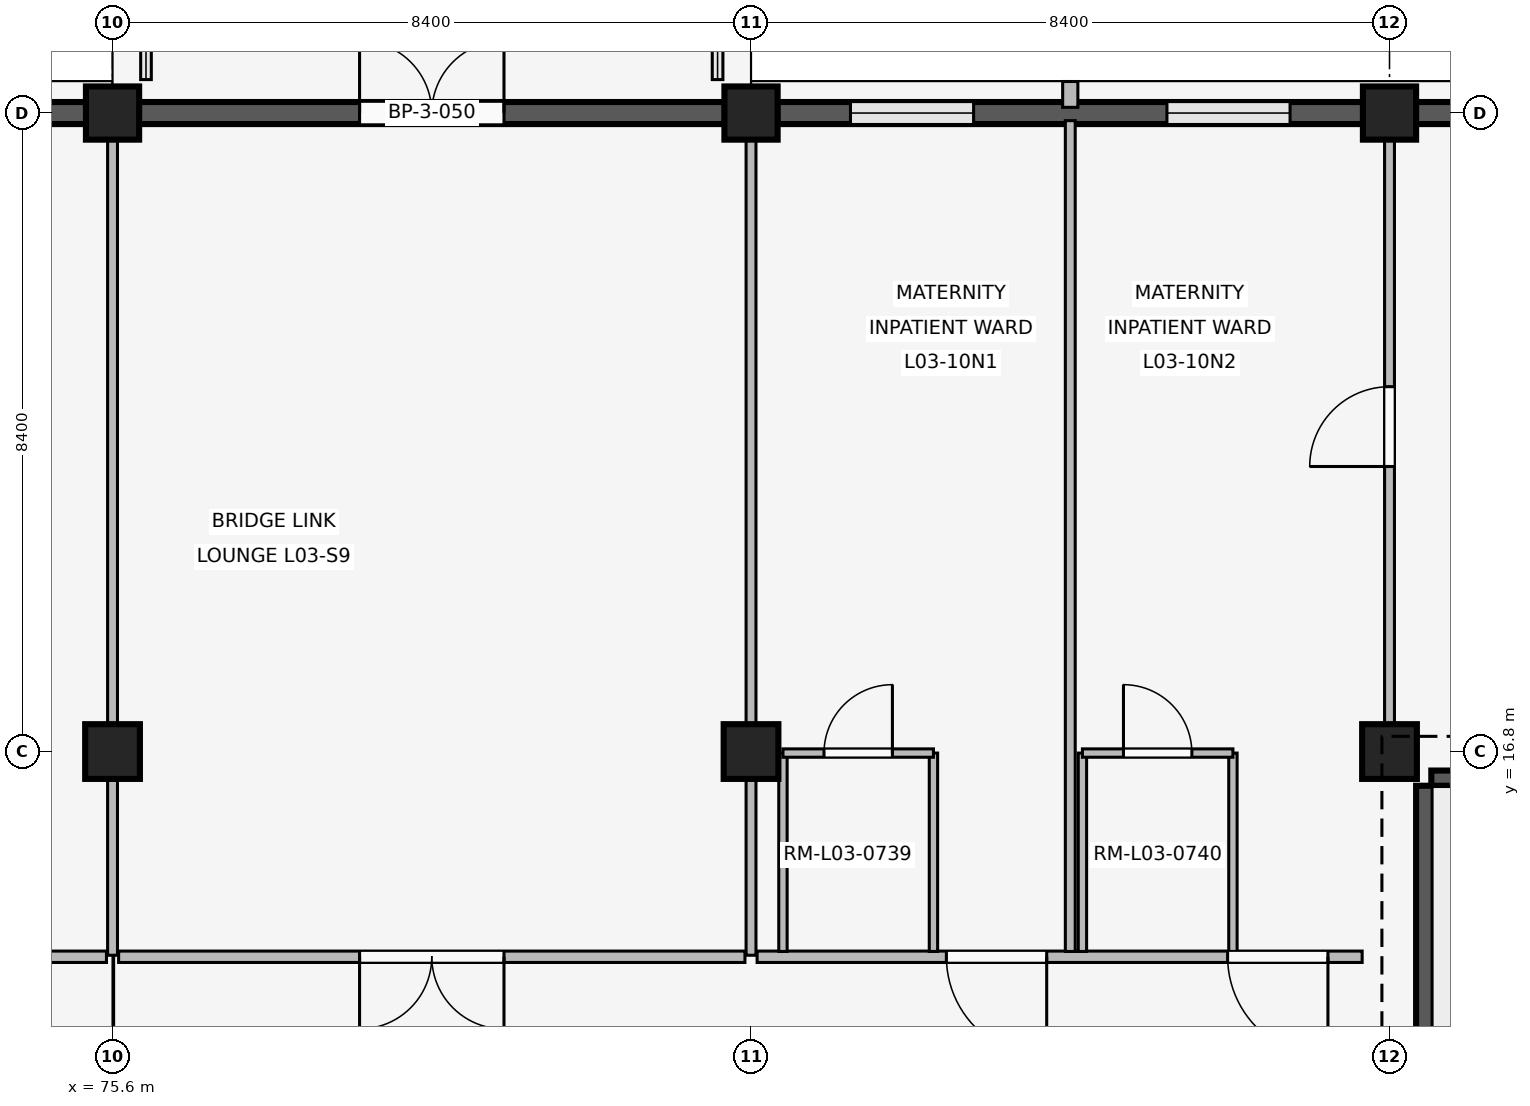
"""IFC4 building model, lengths in metres.
Left out: names, types, materials, properties, quantities, classifications, styles, units other than length and angle.
Written with IfcOpenShell. Run it as: python <this file> out.ifc"""

import sys

from ifc_helpers import new_model, si_unit, direction, frame, frame_2d, origin, origin_2d, place, context, subcontext, project, spatial, rectangle, extrude, element, fill, save


model = new_model("IFC4")
c1 = context("Model", 3, precision=1e-05, world=origin(), true_north=direction((0.0, 1.0)))
c2 = subcontext(c1, "Body", "Model", "MODEL_VIEW")
j1 = project(units=[si_unit("LENGTHUNIT", "METRE"), si_unit("PLANEANGLEUNIT", "RADIAN")], contexts=[c1])
p1 = place(None, origin())
s1 = spatial("IfcSite", under=j1, at=p1, CompositionType="ELEMENT")
p2 = place(p1, origin())
s2 = spatial("IfcBuilding", under=s1, at=p2, CompositionType="ELEMENT")
p3 = place(p2, frame((0.0, 0.0, 12.9)))
s3 = spatial("IfcBuildingStorey", under=s2, at=p3, CompositionType="ELEMENT", Elevation=12.9)
p4 = place(p3, frame((75.6, 16.8, 0.0), z_axis=(0.0, 0.0, 1.0), x_axis=(1.0, 0.0, 0.0)))
e1 = element("IfcColumn", 1, at=p4, inside=s3, PredefinedType="COLUMN", context=c2, shape_type="SweptSolid", body=[
    extrude(rectangle(XDim=0.72, YDim=0.72, at=origin_2d()), origin(), (0.0, 0.0, 1.0), 3.3),
])
p5 = place(p3, frame((75.6, 25.2, 0.0), z_axis=(0.0, 0.0, 1.0), x_axis=(1.0, 0.0, 0.0)))
e2 = element("IfcColumn", 2, at=p5, inside=s3, PredefinedType="COLUMN", context=c2, shape_type="SweptSolid", body=[
    extrude(rectangle(XDim=0.7, YDim=0.7, at=origin_2d()), origin(), (0.0, 0.0, 1.0), 3.3),
])
p6 = place(p3, frame((84.0, 16.8, 0.0), z_axis=(0.0, 0.0, 1.0), x_axis=(1.0, 0.0, 0.0)))
e3 = element("IfcColumn", 3, at=p6, inside=s3, PredefinedType="COLUMN", context=c2, shape_type="SweptSolid", body=[
    extrude(rectangle(XDim=0.72, YDim=0.72, at=origin_2d()), origin(), (0.0, 0.0, 1.0), 3.3),
])
p7 = place(p3, frame((84.0, 25.2, 0.0), z_axis=(0.0, 0.0, 1.0), x_axis=(1.0, 0.0, 0.0)))
e4 = element("IfcColumn", 4, at=p7, inside=s3, PredefinedType="COLUMN", context=c2, shape_type="SweptSolid", body=[
    extrude(rectangle(XDim=0.7, YDim=0.7, at=origin_2d()), origin(), (0.0, 0.0, 1.0), 3.3),
])
p8 = place(p3, frame((92.4, 16.8, 0.0), z_axis=(0.0, 0.0, 1.0), x_axis=(1.0, 0.0, 0.0)))
e5 = element("IfcColumn", 5, at=p8, inside=s3, PredefinedType="COLUMN", context=c2, shape_type="SweptSolid", body=[
    extrude(rectangle(XDim=0.72, YDim=0.72, at=origin_2d()), origin(), (0.0, 0.0, 1.0), 3.3),
])
p9 = place(p3, frame((92.4, 25.2, 0.0), z_axis=(0.0, 0.0, 1.0), x_axis=(1.0, 0.0, 0.0)))
e6 = element("IfcColumn", 6, at=p9, inside=s3, PredefinedType="COLUMN", context=c2, shape_type="SweptSolid", body=[
    extrude(rectangle(XDim=0.7, YDim=0.7, at=origin_2d()), origin(), (0.0, 0.0, 1.0), 3.3),
])
p10 = place(p3, frame((67.545, 25.2, 0.0), z_axis=(0.0, 0.0, 1.0), x_axis=(1.0, 0.0, 0.0)))
e7 = element("IfcWall", 7, at=p10, inside=s3, PredefinedType="SOLIDWALL", context=c2, shape_type="SweptSolid", body=[
    extrude(rectangle(XDim=7.71, YDim=0.29, at=frame_2d((3.855, 0.0))), origin(), (0.0, 0.0, 1.0), 2.44),
])
p11 = place(p10, frame((0.963, 0.0, 0.85)))
e8 = element("IfcOpeningElement", 8, at=p11, cuts=e7, PredefinedType="OPENING", context=c2, shape_type="SweptSolid", body=[
    extrude(rectangle(XDim=1.62, YDim=0.95, at=frame_2d((0.81, 0.475))), frame((0.0, 0.155, 0.0), z_axis=(0.0, -1.0, 0.0), x_axis=(1.0, 0.0, 0.0)), (0.0, 0.0, 1.0), 0.31),
])
p12 = place(p10, frame((5.127, 0.0, 0.85)))
e9 = element("IfcOpeningElement", 9, at=p12, cuts=e7, PredefinedType="OPENING", context=c2, shape_type="SweptSolid", body=[
    extrude(rectangle(XDim=1.62, YDim=0.95, at=frame_2d((0.81, 0.475))), frame((0.0, 0.155, 0.0), z_axis=(0.0, -1.0, 0.0), x_axis=(1.0, 0.0, 0.0)), (0.0, 0.0, 1.0), 0.31),
])
p13 = place(p3, frame((75.945, 25.2, 0.0), z_axis=(0.0, 0.0, 1.0), x_axis=(1.0, 0.0, 0.0)))
e10 = element("IfcWall", 10, at=p13, inside=s3, PredefinedType="SOLIDWALL", context=c2, shape_type="SweptSolid", body=[
    extrude(rectangle(XDim=7.71, YDim=0.29, at=frame_2d((3.855, 0.0))), origin(), (0.0, 0.0, 1.0), 2.44),
])
p14 = place(p13, frame((2.905, 0.0, 0.0)))
e11 = element("IfcOpeningElement", 11, at=p14, cuts=e10, PredefinedType="OPENING", context=c2, shape_type="SweptSolid", body=[
    extrude(rectangle(XDim=1.9, YDim=2.32, at=frame_2d((0.95, 1.16))), frame((0.0, 0.155, 0.0), z_axis=(0.0, -1.0, 0.0), x_axis=(1.0, 0.0, 0.0)), (0.0, 0.0, 1.0), 0.31),
])
p15 = place(p3, frame((84.345, 25.2, 0.0), z_axis=(0.0, 0.0, 1.0), x_axis=(1.0, 0.0, 0.0)))
e12 = element("IfcWall", 12, at=p15, inside=s3, PredefinedType="SOLIDWALL", context=c2, shape_type="SweptSolid", body=[
    extrude(rectangle(XDim=7.71, YDim=0.29, at=frame_2d((3.855, 0.0))), origin(), (0.0, 0.0, 1.0), 2.44),
])
p16 = place(p15, frame((0.963, 0.0, 0.85)))
e13 = element("IfcOpeningElement", 13, at=p16, cuts=e12, PredefinedType="OPENING", context=c2, shape_type="SweptSolid", body=[
    extrude(rectangle(XDim=1.62, YDim=0.95, at=frame_2d((0.81, 0.475))), frame((0.0, 0.155, 0.0), z_axis=(0.0, -1.0, 0.0), x_axis=(1.0, 0.0, 0.0)), (0.0, 0.0, 1.0), 0.31),
])
p17 = place(p15, frame((5.127, 0.0, 0.85)))
e14 = element("IfcOpeningElement", 14, at=p17, cuts=e12, PredefinedType="OPENING", context=c2, shape_type="SweptSolid", body=[
    extrude(rectangle(XDim=1.62, YDim=0.95, at=frame_2d((0.81, 0.475))), frame((0.0, 0.155, 0.0), z_axis=(0.0, -1.0, 0.0), x_axis=(1.0, 0.0, 0.0)), (0.0, 0.0, 1.0), 0.31),
])
p18 = place(p3, frame((88.2, 25.275, 0.0), z_axis=(0.0, 0.0, 1.0), x_axis=(0.0, 1.0, 0.0)))
e15 = element("IfcWall", 15, at=p18, inside=s3, PredefinedType="ELEMENTEDWALL", context=c2, shape_type="SweptSolid", body=[
    extrude(rectangle(XDim=0.34, YDim=0.2, at=frame_2d((0.17, 0.0))), origin(), (0.0, 0.0, 1.0), 2.42),
])
p19 = place(p3, frame((92.745, 25.2, 0.0), z_axis=(0.0, 0.0, 1.0), x_axis=(1.0, 0.0, 0.0)))
e16 = element("IfcWall", 16, at=p19, inside=s3, PredefinedType="SOLIDWALL", context=c2, shape_type="SweptSolid", body=[
    extrude(rectangle(XDim=7.71, YDim=0.29, at=frame_2d((3.855, 0.0))), origin(), (0.0, 0.0, 1.0), 2.44),
])
p20 = place(p19, frame((1.043, 0.0, 0.85)))
e17 = element("IfcOpeningElement", 17, at=p20, cuts=e16, PredefinedType="OPENING", context=c2, shape_type="SweptSolid", body=[
    extrude(rectangle(XDim=1.46, YDim=0.85, at=frame_2d((0.73, 0.425))), frame((0.0, 0.155, 0.0), z_axis=(0.0, -1.0, 0.0), x_axis=(1.0, 0.0, 0.0)), (0.0, 0.0, 1.0), 0.31),
])
p21 = place(p19, frame((5.207, 0.0, 0.85)))
e18 = element("IfcOpeningElement", 18, at=p21, cuts=e16, PredefinedType="OPENING", context=c2, shape_type="SweptSolid", body=[
    extrude(rectangle(XDim=1.46, YDim=0.85, at=frame_2d((0.73, 0.425))), frame((0.0, 0.155, 0.0), z_axis=(0.0, -1.0, 0.0), x_axis=(1.0, 0.0, 0.0)), (0.0, 0.0, 1.0), 0.31),
])
p22 = place(p3, frame((92.95, 16.35, 0.0), z_axis=(0.0, 0.0, 1.0), x_axis=(1.0, 0.0, 0.0)))
e19 = element("IfcWall", 19, at=p22, inside=s3, PredefinedType="SHEAR", context=c2, shape_type="SweptSolid", body=[
    extrude(rectangle(XDim=7.5, YDim=0.4, at=frame_2d((3.75, 0.0))), origin(), (0.0, 0.0, 1.0), 3.02),
])
p23 = place(p3, frame((92.95, 8.8, 0.0), z_axis=(0.0, 0.0, 1.0), x_axis=(0.0, 1.0, 0.0)))
e20 = element("IfcWall", 20, at=p23, inside=s3, PredefinedType="SHEAR", context=c2, shape_type="SweptSolid", body=[
    extrude(rectangle(XDim=7.55, YDim=0.4, at=frame_2d((3.775, 0.0))), origin(), (0.0, 0.0, 1.0), 3.02),
])
p24 = place(p23, frame((0.28, 0.0, 0.0)))
e21 = element("IfcOpeningElement", 21, at=p24, cuts=e20, PredefinedType="OPENING", context=c2, shape_type="SweptSolid", body=[
    extrude(rectangle(XDim=1.0, YDim=2.15, at=frame_2d((0.5, 1.075))), frame((0.0, 0.21, 0.0), z_axis=(0.0, -1.0, 0.0), x_axis=(1.0, 0.0, 0.0)), (0.0, 0.0, 1.0), 0.42),
])
p25 = place(p3, frame((75.52, 14.1, 0.0), z_axis=(0.0, 0.0, 1.0), x_axis=(-1.0, 0.0, 0.0)))
e22 = element("IfcWall", 22, at=p25, inside=s3, PredefinedType="PARTITIONING", context=c2, shape_type="SweptSolid", body=[
    extrude(rectangle(XDim=8.24, YDim=0.15, at=frame_2d((4.12, 0.0))), origin(), (0.0, 0.0, 1.0), 2.42),
])
p26 = place(p25, frame((3.495, 0.0, 0.0)))
e23 = element("IfcOpeningElement", 23, at=p26, cuts=e22, PredefinedType="OPENING", context=c2, shape_type="SweptSolid", body=[
    extrude(rectangle(XDim=1.25, YDim=2.2, at=frame_2d((0.625, 1.1))), frame((0.0, 0.085, 0.0), z_axis=(0.0, -1.0, 0.0), x_axis=(1.0, 0.0, 0.0)), (0.0, 0.0, 1.0), 0.17),
])
p27 = place(p3, frame((75.6, 14.12, 0.0), z_axis=(0.0, 0.0, 1.0), x_axis=(0.0, 1.0, 0.0)))
e24 = element("IfcWall", 24, at=p27, inside=s3, PredefinedType="PARTITIONING", context=c2, shape_type="SweptSolid", body=[
    extrude(rectangle(XDim=10.94, YDim=0.13, at=frame_2d((5.47, 0.0))), origin(), (0.0, 0.0, 1.0), 2.42),
])
p28 = place(p3, frame((83.92, 14.1, 0.0), z_axis=(0.0, 0.0, 1.0), x_axis=(-1.0, 0.0, 0.0)))
e25 = element("IfcWall", 25, at=p28, inside=s3, PredefinedType="PARTITIONING", context=c2, shape_type="SweptSolid", body=[
    extrude(rectangle(XDim=8.24, YDim=0.15, at=frame_2d((4.12, 0.0))), origin(), (0.0, 0.0, 1.0), 2.42),
])
p29 = place(p28, frame((3.17, 0.0, 0.0)))
e26 = element("IfcOpeningElement", 26, at=p29, cuts=e25, PredefinedType="OPENING", context=c2, shape_type="SweptSolid", body=[
    extrude(rectangle(XDim=1.9, YDim=2.32, at=frame_2d((0.95, 1.16))), frame((0.0, 0.085, 0.0), z_axis=(0.0, -1.0, 0.0), x_axis=(1.0, 0.0, 0.0)), (0.0, 0.0, 1.0), 0.17),
])
p30 = place(p3, frame((84.0, 14.12, 0.0), z_axis=(0.0, 0.0, 1.0), x_axis=(0.0, 1.0, 0.0)))
e27 = element("IfcWall", 27, at=p30, inside=s3, PredefinedType="PARTITIONING", context=c2, shape_type="SweptSolid", body=[
    extrude(rectangle(XDim=10.94, YDim=0.13, at=frame_2d((5.47, 0.0))), origin(), (0.0, 0.0, 1.0), 2.42),
])
p31 = place(p3, frame((92.04, 14.1, 0.0), z_axis=(0.0, 0.0, 1.0), x_axis=(-1.0, 0.0, 0.0)))
e28 = element("IfcWall", 28, at=p31, inside=s3, PredefinedType="PARTITIONING", context=c2, shape_type="SweptSolid", body=[
    extrude(rectangle(XDim=7.96, YDim=0.15, at=frame_2d((3.98, 0.0))), origin(), (0.0, 0.0, 1.0), 2.42),
])
p32 = place(p31, frame((0.45, 0.0, 0.0)))
e29 = element("IfcOpeningElement", 29, at=p32, cuts=e28, PredefinedType="OPENING", context=c2, shape_type="SweptSolid", body=[
    extrude(rectangle(XDim=1.32, YDim=2.25, at=frame_2d((0.66, 1.125))), frame((0.0, 0.085, 0.0), z_axis=(0.0, -1.0, 0.0), x_axis=(1.0, 0.0, 0.0)), (0.0, 0.0, 1.0), 0.17),
])
p33 = place(p31, frame((4.15, 0.0, 0.0)))
e30 = element("IfcOpeningElement", 30, at=p33, cuts=e28, PredefinedType="OPENING", context=c2, shape_type="SweptSolid", body=[
    extrude(rectangle(XDim=1.32, YDim=2.25, at=frame_2d((0.66, 1.125))), frame((0.0, 0.085, 0.0), z_axis=(0.0, -1.0, 0.0), x_axis=(1.0, 0.0, 0.0)), (0.0, 0.0, 1.0), 0.17),
])
p34 = place(p3, frame((88.2, 14.17, 0.0), z_axis=(0.0, 0.0, 1.0), x_axis=(0.0, 1.0, 0.0)))
e31 = element("IfcWall", 31, at=p34, inside=s3, PredefinedType="PARTITIONING", context=c2, shape_type="SweptSolid", body=[
    extrude(rectangle(XDim=10.93, YDim=0.13, at=frame_2d((5.465, 0.0))), origin(), (0.0, 0.0, 1.0), 2.42),
])
for number, where, z_axis, x_axis in (
    (32, (84.42, 14.17, 0.0), (0.0, 0.0, 1.0), (0.0, 1.0, 0.0)),
    (33, (86.4, 14.17, 0.0), (0.0, 0.0, 1.0), (0.0, 1.0, 0.0)),
):
    element("IfcWall", number, at=place(p3, frame(where, z_axis=z_axis, x_axis=x_axis)), inside=s3, PredefinedType="PARTITIONING", context=c2, shape_type="SweptSolid", body=[
        extrude(rectangle(XDim=2.61, YDim=0.11, at=frame_2d((1.305, 0.0))), origin(), (0.0, 0.0, 1.0), 2.42),
    ])
p35 = place(p3, frame((84.42, 16.78, 0.0), z_axis=(0.0, 0.0, 1.0), x_axis=(1.0, 0.0, 0.0)))
e34 = element("IfcWall", 34, at=p35, inside=s3, PredefinedType="PARTITIONING", context=c2, shape_type="SweptSolid", body=[
    extrude(rectangle(XDim=1.98, YDim=0.11, at=frame_2d((0.99, 0.0))), origin(), (0.0, 0.0, 1.0), 2.42),
])
p36 = place(p35, frame((0.54, 0.0, 0.0)))
e35 = element("IfcOpeningElement", 35, at=p36, cuts=e34, PredefinedType="OPENING", context=c2, shape_type="SweptSolid", body=[
    extrude(rectangle(XDim=0.9, YDim=2.1, at=frame_2d((0.45, 1.05))), frame((0.0, 0.065, 0.0), z_axis=(0.0, -1.0, 0.0), x_axis=(1.0, 0.0, 0.0)), (0.0, 0.0, 1.0), 0.13),
])
for number, where, z_axis, x_axis in (
    (36, (88.36, 14.17, 0.0), (0.0, 0.0, 1.0), (0.0, 1.0, 0.0)),
    (37, (90.34, 14.17, 0.0), (0.0, 0.0, 1.0), (0.0, 1.0, 0.0)),
):
    element("IfcWall", number, at=place(p3, frame(where, z_axis=z_axis, x_axis=x_axis)), inside=s3, PredefinedType="PARTITIONING", context=c2, shape_type="SweptSolid", body=[
        extrude(rectangle(XDim=2.61, YDim=0.11, at=frame_2d((1.305, 0.0))), origin(), (0.0, 0.0, 1.0), 2.42),
    ])
p37 = place(p3, frame((88.36, 16.78, 0.0), z_axis=(0.0, 0.0, 1.0), x_axis=(1.0, 0.0, 0.0)))
e38 = element("IfcWall", 38, at=p37, inside=s3, PredefinedType="PARTITIONING", context=c2, shape_type="SweptSolid", body=[
    extrude(rectangle(XDim=1.98, YDim=0.11, at=frame_2d((0.99, 0.0))), origin(), (0.0, 0.0, 1.0), 2.42),
])
p38 = place(p37, frame((0.54, 0.0, 0.0)))
e39 = element("IfcOpeningElement", 39, at=p38, cuts=e38, PredefinedType="OPENING", context=c2, shape_type="SweptSolid", body=[
    extrude(rectangle(XDim=0.9, YDim=2.1, at=frame_2d((0.45, 1.05))), frame((0.0, 0.065, 0.0), z_axis=(0.0, -1.0, 0.0), x_axis=(1.0, 0.0, 0.0)), (0.0, 0.0, 1.0), 0.13),
])
p39 = place(p3, frame((92.4, 17.15, 0.0), z_axis=(0.0, 0.0, 1.0), x_axis=(0.0, 1.0, 0.0)))
e40 = element("IfcWall", 40, at=p39, inside=s3, PredefinedType="PARTITIONING", context=c2, shape_type="SweptSolid", body=[
    extrude(rectangle(XDim=7.91, YDim=0.13, at=frame_2d((3.955, 0.0))), origin(), (0.0, 0.0, 1.0), 2.42),
])
p40 = place(p39, frame((3.4, 0.0, 0.0)))
e41 = element("IfcOpeningElement", 41, at=p40, cuts=e40, PredefinedType="OPENING", context=c2, shape_type="SweptSolid", body=[
    extrude(rectangle(XDim=1.05, YDim=2.2, at=frame_2d((0.525, 1.1))), frame((0.0, 0.075, 0.0), z_axis=(0.0, -1.0, 0.0), x_axis=(1.0, 0.0, 0.0)), (0.0, 0.0, 1.0), 0.15),
])
p41 = place(p14, origin())
e42 = element("IfcDoor", 42, at=p41, inside=s3, OperationType="DOUBLE_SWING_LEFT", PredefinedType="DOOR", context=c2, shape_type="SweptSolid", body=[
    extrude(rectangle(XDim=1.9, YDim=2.32, at=frame_2d((0.95, 1.16))), frame((0.0, 0.025, 0.0), z_axis=(0.0, -1.0, 0.0), x_axis=(1.0, 0.0, 0.0)), (0.0, 0.0, 1.0), 0.05),
])
fill(e11, e42)
p42 = place(p16, origin())
e43 = element("IfcWindow", 43, at=p42, inside=s3, PartitioningType="SINGLE_PANEL", PredefinedType="WINDOW", context=c2, shape_type="SweptSolid", body=[
    extrude(rectangle(XDim=1.62, YDim=0.95, at=frame_2d((0.81, 0.475))), frame((0.0, 0.03, 0.0), z_axis=(0.0, -1.0, 0.0), x_axis=(1.0, 0.0, 0.0)), (0.0, 0.0, 1.0), 0.06),
])
fill(e13, e43)
p43 = place(p17, origin())
e44 = element("IfcWindow", 44, at=p43, inside=s3, PartitioningType="SINGLE_PANEL", PredefinedType="WINDOW", context=c2, shape_type="SweptSolid", body=[
    extrude(rectangle(XDim=1.62, YDim=0.95, at=frame_2d((0.81, 0.475))), frame((0.0, 0.03, 0.0), z_axis=(0.0, -1.0, 0.0), x_axis=(1.0, 0.0, 0.0)), (0.0, 0.0, 1.0), 0.06),
])
fill(e14, e44)
p44 = place(p29, origin())
e45 = element("IfcDoor", 45, at=p44, inside=s3, OperationType="DOUBLE_SWING_LEFT", PredefinedType="DOOR", context=c2, shape_type="SweptSolid", body=[
    extrude(rectangle(XDim=1.9, YDim=2.32, at=frame_2d((0.95, 1.16))), frame((0.0, 0.025, 0.0), z_axis=(0.0, -1.0, 0.0), x_axis=(1.0, 0.0, 0.0)), (0.0, 0.0, 1.0), 0.05),
])
fill(e26, e45)
p45 = place(p32, origin())
e46 = element("IfcDoor", 46, at=p45, inside=s3, OperationType="SINGLE_SWING_LEFT", PredefinedType="DOOR", context=c2, shape_type="SweptSolid", body=[
    extrude(rectangle(XDim=1.32, YDim=2.25, at=frame_2d((0.66, 1.125))), frame((0.0, 0.025, 0.0), z_axis=(0.0, -1.0, 0.0), x_axis=(1.0, 0.0, 0.0)), (0.0, 0.0, 1.0), 0.05),
])
fill(e29, e46)
p46 = place(p33, origin())
e47 = element("IfcDoor", 47, at=p46, inside=s3, OperationType="SINGLE_SWING_LEFT", PredefinedType="DOOR", context=c2, shape_type="SweptSolid", body=[
    extrude(rectangle(XDim=1.32, YDim=2.25, at=frame_2d((0.66, 1.125))), frame((0.0, 0.025, 0.0), z_axis=(0.0, -1.0, 0.0), x_axis=(1.0, 0.0, 0.0)), (0.0, 0.0, 1.0), 0.05),
])
fill(e30, e47)
p47 = place(p36, origin())
e48 = element("IfcDoor", 48, at=p47, inside=s3, OperationType="SINGLE_SWING_RIGHT", PredefinedType="DOOR", context=c2, shape_type="SweptSolid", body=[
    extrude(rectangle(XDim=0.9, YDim=2.1, at=frame_2d((0.45, 1.05))), frame((0.0, 0.025, 0.0), z_axis=(0.0, -1.0, 0.0), x_axis=(1.0, 0.0, 0.0)), (0.0, 0.0, 1.0), 0.05),
])
fill(e35, e48)
p48 = place(p38, origin())
e49 = element("IfcDoor", 49, at=p48, inside=s3, OperationType="SINGLE_SWING_LEFT", PredefinedType="DOOR", context=c2, shape_type="SweptSolid", body=[
    extrude(rectangle(XDim=0.9, YDim=2.1, at=frame_2d((0.45, 1.05))), frame((0.0, 0.025, 0.0), z_axis=(0.0, -1.0, 0.0), x_axis=(1.0, 0.0, 0.0)), (0.0, 0.0, 1.0), 0.05),
])
fill(e39, e49)
p49 = place(p40, origin())
e50 = element("IfcDoor", 50, at=p49, inside=s3, OperationType="SINGLE_SWING_LEFT", PredefinedType="DOOR", context=c2, shape_type="SweptSolid", body=[
    extrude(rectangle(XDim=1.05, YDim=2.2, at=frame_2d((0.525, 1.1))), frame((0.0, 0.025, 0.0), z_axis=(0.0, -1.0, 0.0), x_axis=(1.0, 0.0, 0.0)), (0.0, 0.0, 1.0), 0.05),
])
fill(e41, e50)
save(model, sys.argv[1])
